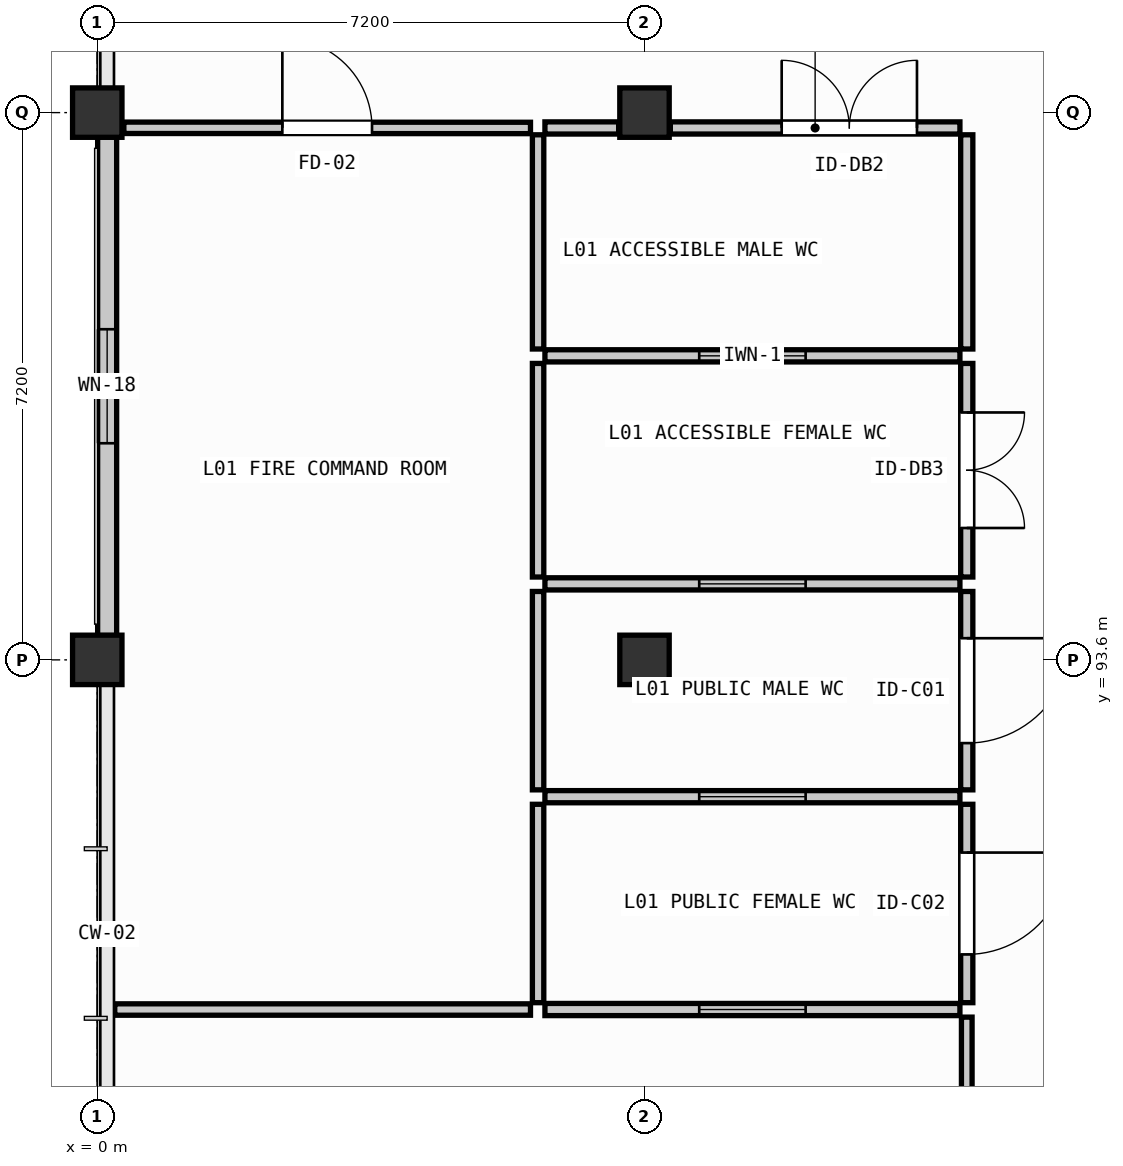
"""IFC4 building model, lengths in metres.
Left out: names, types, materials, properties, quantities, classifications, styles, units other than length and angle.
Written with IfcOpenShell. Run it as: python <this file> out.ifc"""

import sys

from ifc_helpers import new_model, si_unit, direction, frame, frame_2d, origin, origin_2d, place, context, subcontext, project, spatial, rectangle, extrude, element, fill, save


model = new_model("IFC4")
c1 = context("Model", 3, precision=1e-05, world=origin(), true_north=direction((0.0, 1.0)))
c2 = subcontext(c1, "Body", "Model", "MODEL_VIEW")
j1 = project(units=[si_unit("LENGTHUNIT", "METRE"), si_unit("PLANEANGLEUNIT", "RADIAN")], contexts=[c1])
p1 = place(None, origin())
s1 = spatial("IfcSite", under=j1, at=p1, CompositionType="ELEMENT")
p2 = place(p1, origin())
s2 = spatial("IfcBuilding", under=s1, at=p2, CompositionType="ELEMENT")
p3 = place(p2, origin())
s3 = spatial("IfcBuildingStorey", under=s2, at=p3, CompositionType="ELEMENT", Elevation=0.0)
for number, where, z_axis, x_axis in (
    (1, (0.0, 93.6, 0.0), (0.0, 0.0, 1.0), (1.0, 0.0, 0.0)),
    (2, (0.0, 100.8, 0.0), (0.0, 0.0, 1.0), (1.0, 0.0, 0.0)),
    (3, (7.2, 93.6, 0.0), (0.0, 0.0, 1.0), (1.0, 0.0, 0.0)),
    (4, (7.2, 100.8, 0.0), (0.0, 0.0, 1.0), (1.0, 0.0, 0.0)),
):
    element("IfcColumn", number, at=place(p3, frame(where, z_axis=z_axis, x_axis=x_axis)), inside=s3, PredefinedType="COLUMN", context=c2, shape_type="SweptSolid", body=[
        extrude(rectangle(XDim=0.65, YDim=0.65, at=origin_2d()), origin(), (0.0, 0.0, 1.0), 4.56),
    ])
p4 = place(p3, frame((0.13, 93.92, 0.0), z_axis=(0.0, 0.0, 1.0), x_axis=(0.0, 1.0, 0.0)))
e5 = element("IfcWall", 5, at=p4, inside=s3, PredefinedType="SOLIDWALL", context=c2, shape_type="SweptSolid", body=[
    extrude(rectangle(XDim=6.56, YDim=0.25, at=frame_2d((3.28, 0.0))), origin(), (0.0, 0.0, 1.0), 3.76),
])
p5 = place(p4, frame((2.53, 0.0, 1.5)))
e6 = element("IfcOpeningElement", 6, at=p5, cuts=e5, PredefinedType="OPENING", context=c2, shape_type="SweptSolid", body=[
    extrude(rectangle(XDim=1.5, YDim=0.95, at=frame_2d((0.75, 0.475))), frame((0.0, 0.135, 0.0), z_axis=(0.0, -1.0, 0.0), x_axis=(1.0, 0.0, 0.0)), (0.0, 0.0, 1.0), 0.27),
])
p6 = place(p3, frame((5.89, 100.598, 0.0), z_axis=(0.0, 0.0, 1.0), x_axis=(1.0, 0.0, 0.0)))
e7 = element("IfcWall", 7, at=p6, inside=s3, PredefinedType="PLUMBINGWALL", context=c2, shape_type="SweptSolid", body=[
    extrude(rectangle(XDim=0.97, YDim=0.16, at=frame_2d((0.485, 0.0))), origin(), (0.0, 0.0, 1.0), 3.76),
])
p7 = place(p3, frame((7.54, 100.598, 0.0), z_axis=(0.0, 0.0, 1.0), x_axis=(1.0, 0.0, 0.0)))
e8 = element("IfcWall", 8, at=p7, inside=s3, PredefinedType="PLUMBINGWALL", context=c2, shape_type="SweptSolid", body=[
    extrude(rectangle(XDim=3.81, YDim=0.16, at=frame_2d((1.905, 0.0))), origin(), (0.0, 0.0, 1.0), 3.76),
])
p8 = place(p7, frame((1.465, 0.0, 0.0)))
e9 = element("IfcOpeningElement", 9, at=p8, cuts=e8, PredefinedType="OPENING", context=c2, shape_type="SweptSolid", body=[
    extrude(rectangle(XDim=1.78, YDim=2.32, at=frame_2d((0.89, 1.16))), frame((0.0, 0.09, 0.0), z_axis=(0.0, -1.0, 0.0), x_axis=(1.0, 0.0, 0.0)), (0.0, 0.0, 1.0), 0.18),
])
p9 = place(p3, frame((11.44, 100.508, 0.0), z_axis=(0.0, 0.0, 1.0), x_axis=(0.0, -1.0, 0.0)))
e10 = element("IfcWall", 10, at=p9, inside=s3, PredefinedType="PLUMBINGWALL", context=c2, shape_type="SweptSolid", body=[
    extrude(rectangle(XDim=2.818, YDim=0.16, at=frame_2d((1.409, 0.0))), origin(), (0.0, 0.0, 1.0), 3.76),
])
p10 = place(p3, frame((11.35, 97.6, 0.0), z_axis=(0.0, 0.0, 1.0), x_axis=(-1.0, 0.0, 0.0)))
e11 = element("IfcWall", 11, at=p10, inside=s3, PredefinedType="PLUMBINGWALL", context=c2, shape_type="SweptSolid", body=[
    extrude(rectangle(XDim=5.46, YDim=0.16, at=frame_2d((2.73, 0.0))), origin(), (0.0, 0.0, 1.0), 3.86),
])
p11 = place(p10, frame((2.03, 0.0, 1.15)))
e12 = element("IfcOpeningElement", 12, at=p11, cuts=e11, PredefinedType="OPENING", context=c2, shape_type="SweptSolid", body=[
    extrude(rectangle(XDim=1.4, YDim=1.05, at=frame_2d((0.7, 0.525))), frame((0.0, 0.09, 0.0), z_axis=(0.0, -1.0, 0.0), x_axis=(1.0, 0.0, 0.0)), (0.0, 0.0, 1.0), 0.18),
])
p12 = place(p3, frame((5.8, 97.69, 0.0), z_axis=(0.0, 0.0, 1.0), x_axis=(0.0, 1.0, 0.0)))
e13 = element("IfcWall", 13, at=p12, inside=s3, PredefinedType="PARTITIONING", context=c2, shape_type="SweptSolid", body=[
    extrude(rectangle(XDim=2.818, YDim=0.15, at=frame_2d((1.409, 0.0))), origin(), (0.0, 0.0, 1.0), 3.76),
])
p13 = place(p3, frame((11.44, 97.5, 0.0), z_axis=(0.0, 0.0, 1.0), x_axis=(0.0, -1.0, 0.0)))
e14 = element("IfcWall", 14, at=p13, inside=s3, PredefinedType="PLUMBINGWALL", context=c2, shape_type="SweptSolid", body=[
    extrude(rectangle(XDim=2.81, YDim=0.16, at=frame_2d((1.405, 0.0))), origin(), (0.0, 0.0, 1.0), 4.57),
])
p14 = place(p13, frame((0.645, 0.0, 0.0)))
e15 = element("IfcOpeningElement", 15, at=p14, cuts=e14, PredefinedType="OPENING", context=c2, shape_type="SweptSolid", body=[
    extrude(rectangle(XDim=1.52, YDim=2.26, at=frame_2d((0.76, 1.13))), frame((0.0, 0.09, 0.0), z_axis=(0.0, -1.0, 0.0), x_axis=(1.0, 0.0, 0.0)), (0.0, 0.0, 1.0), 0.18),
])
p15 = place(p3, frame((11.35, 94.6, 0.0), z_axis=(0.0, 0.0, 1.0), x_axis=(-1.0, 0.0, 0.0)))
e16 = element("IfcWall", 16, at=p15, inside=s3, PredefinedType="PLUMBINGWALL", context=c2, shape_type="SweptSolid", body=[
    extrude(rectangle(XDim=5.46, YDim=0.16, at=frame_2d((2.73, 0.0))), origin(), (0.0, 0.0, 1.0), 3.86),
])
p16 = place(p15, frame((2.03, 0.0, 1.15)))
e17 = element("IfcOpeningElement", 17, at=p16, cuts=e16, PredefinedType="OPENING", context=c2, shape_type="SweptSolid", body=[
    extrude(rectangle(XDim=1.4, YDim=1.05, at=frame_2d((0.7, 0.525))), frame((0.0, 0.09, 0.0), z_axis=(0.0, -1.0, 0.0), x_axis=(1.0, 0.0, 0.0)), (0.0, 0.0, 1.0), 0.18),
])
p17 = place(p3, frame((5.8, 94.69, 0.0), z_axis=(0.0, 0.0, 1.0), x_axis=(0.0, 1.0, 0.0)))
e18 = element("IfcWall", 18, at=p17, inside=s3, PredefinedType="PARTITIONING", context=c2, shape_type="SweptSolid", body=[
    extrude(rectangle(XDim=2.81, YDim=0.15, at=frame_2d((1.405, 0.0))), origin(), (0.0, 0.0, 1.0), 4.57),
])
p18 = place(p3, frame((11.44, 94.5, 0.0), z_axis=(0.0, 0.0, 1.0), x_axis=(0.0, -1.0, 0.0)))
e19 = element("IfcWall", 19, at=p18, inside=s3, PredefinedType="PLUMBINGWALL", context=c2, shape_type="SweptSolid", body=[
    extrude(rectangle(XDim=2.61, YDim=0.16, at=frame_2d((1.305, 0.0))), origin(), (0.0, 0.0, 1.0), 3.76),
])
p19 = place(p18, frame((0.615, 0.0, 0.0)))
e20 = element("IfcOpeningElement", 20, at=p19, cuts=e19, PredefinedType="OPENING", context=c2, shape_type="SweptSolid", body=[
    extrude(rectangle(XDim=1.38, YDim=2.32, at=frame_2d((0.69, 1.16))), frame((0.0, 0.09, 0.0), z_axis=(0.0, -1.0, 0.0), x_axis=(1.0, 0.0, 0.0)), (0.0, 0.0, 1.0), 0.18),
])
p20 = place(p3, frame((11.35, 91.8, 0.0), z_axis=(0.0, 0.0, 1.0), x_axis=(-1.0, 0.0, 0.0)))
e21 = element("IfcWall", 21, at=p20, inside=s3, PredefinedType="PLUMBINGWALL", context=c2, shape_type="SweptSolid", body=[
    extrude(rectangle(XDim=5.46, YDim=0.16, at=frame_2d((2.73, 0.0))), origin(), (0.0, 0.0, 1.0), 3.86),
])
p21 = place(p20, frame((2.03, 0.0, 1.15)))
e22 = element("IfcOpeningElement", 22, at=p21, cuts=e21, PredefinedType="OPENING", context=c2, shape_type="SweptSolid", body=[
    extrude(rectangle(XDim=1.4, YDim=1.05, at=frame_2d((0.7, 0.525))), frame((0.0, 0.09, 0.0), z_axis=(0.0, -1.0, 0.0), x_axis=(1.0, 0.0, 0.0)), (0.0, 0.0, 1.0), 0.18),
])
p22 = place(p3, frame((5.8, 91.89, 0.0), z_axis=(0.0, 0.0, 1.0), x_axis=(0.0, 1.0, 0.0)))
e23 = element("IfcWall", 23, at=p22, inside=s3, PredefinedType="PARTITIONING", context=c2, shape_type="SweptSolid", body=[
    extrude(rectangle(XDim=2.61, YDim=0.15, at=frame_2d((1.305, 0.0))), origin(), (0.0, 0.0, 1.0), 3.76),
])
p23 = place(p3, frame((11.44, 91.7, 0.0), z_axis=(0.0, 0.0, 1.0), x_axis=(0.0, -1.0, 0.0)))
e24 = element("IfcWall", 24, at=p23, inside=s3, PredefinedType="PLUMBINGWALL", context=c2, shape_type="SweptSolid", body=[
    extrude(rectangle(XDim=2.61, YDim=0.16, at=frame_2d((1.305, 0.0))), origin(), (0.0, 0.0, 1.0), 4.57),
])
p24 = place(p23, frame((0.635, 0.0, 0.0)))
e25 = element("IfcOpeningElement", 25, at=p24, cuts=e24, PredefinedType="OPENING", context=c2, shape_type="SweptSolid", body=[
    extrude(rectangle(XDim=1.34, YDim=2.24, at=frame_2d((0.67, 1.12))), frame((0.0, 0.09, 0.0), z_axis=(0.0, -1.0, 0.0), x_axis=(1.0, 0.0, 0.0)), (0.0, 0.0, 1.0), 0.18),
])
p25 = place(p3, frame((11.35, 89.0, 0.0), z_axis=(0.0, 0.0, 1.0), x_axis=(-1.0, 0.0, 0.0)))
e26 = element("IfcWall", 26, at=p25, inside=s3, PredefinedType="PLUMBINGWALL", context=c2, shape_type="SweptSolid", body=[
    extrude(rectangle(XDim=5.46, YDim=0.16, at=frame_2d((2.73, 0.0))), origin(), (0.0, 0.0, 1.0), 3.86),
])
p26 = place(p25, frame((2.03, 0.0, 1.15)))
e27 = element("IfcOpeningElement", 27, at=p26, cuts=e26, PredefinedType="OPENING", context=c2, shape_type="SweptSolid", body=[
    extrude(rectangle(XDim=1.4, YDim=1.05, at=frame_2d((0.7, 0.525))), frame((0.0, 0.09, 0.0), z_axis=(0.0, -1.0, 0.0), x_axis=(1.0, 0.0, 0.0)), (0.0, 0.0, 1.0), 0.18),
])
p27 = place(p3, frame((5.8, 89.09, 0.0), z_axis=(0.0, 0.0, 1.0), x_axis=(0.0, 1.0, 0.0)))
e28 = element("IfcWall", 28, at=p27, inside=s3, PredefinedType="PARTITIONING", context=c2, shape_type="SweptSolid", body=[
    extrude(rectangle(XDim=2.61, YDim=0.15, at=frame_2d((1.305, 0.0))), origin(), (0.0, 0.0, 1.0), 4.57),
])
p28 = place(p3, frame((0.35, 100.6, 0.0), z_axis=(0.0, 0.0, 1.0), x_axis=(0.999999915657, -0.000410715066, 0.0)))
e29 = element("IfcWall", 29, at=p28, inside=s3, PredefinedType="PARTITIONING", context=c2, shape_type="SweptSolid", body=[
    extrude(rectangle(XDim=5.35, YDim=0.15, at=frame_2d((2.675, 0.0))), origin(), (0.0, 0.0, 1.0), 3.76),
])
p29 = place(p28, frame((2.085, 0.0, 0.0)))
e30 = element("IfcOpeningElement", 30, at=p29, cuts=e29, PredefinedType="OPENING", context=c2, shape_type="SweptSolid", body=[
    extrude(rectangle(XDim=1.18, YDim=2.16, at=frame_2d((0.59, 1.08))), frame((0.0, 0.085, 0.0), z_axis=(0.0, -1.0, 0.0), x_axis=(1.0, 0.0, 0.0)), (0.0, 0.0, 1.0), 0.17),
])
p30 = place(p3, frame((5.7, 89.0, 0.0), z_axis=(0.0, 0.0, 1.0), x_axis=(-1.0, 0.0, 0.0)))
e31 = element("IfcWall", 31, at=p30, inside=s3, PredefinedType="PARTITIONING", context=c2, shape_type="SweptSolid", body=[
    extrude(rectangle(XDim=5.47, YDim=0.15, at=frame_2d((2.735, 0.0))), origin(), (0.0, 0.0, 1.0), 3.86),
])
p31 = place(p3, frame((11.44, 88.9, 0.0), z_axis=(0.0, 0.0, 1.0), x_axis=(0.0, -1.0, 0.0)))
e32 = element("IfcWall", 32, at=p31, inside=s3, PredefinedType="PARTITIONING", context=c2, shape_type="SweptSolid", body=[
    extrude(rectangle(XDim=16.67, YDim=0.14, at=frame_2d((8.335, 0.0))), origin(), (0.0, 0.0, 1.0), 3.76),
])
p32 = place(p31, frame((7.475, 0.0, 0.0)))
e33 = element("IfcOpeningElement", 33, at=p32, cuts=e32, PredefinedType="OPENING", context=c2, shape_type="SweptSolid", body=[
    extrude(rectangle(XDim=1.72, YDim=2.26, at=frame_2d((0.86, 1.13))), frame((0.0, 0.08, 0.0), z_axis=(0.0, -1.0, 0.0), x_axis=(1.0, 0.0, 0.0)), (0.0, 0.0, 1.0), 0.16),
])
p33 = place(p5, origin())
e34 = element("IfcWindow", 34, at=p33, inside=s3, PartitioningType="SINGLE_PANEL", PredefinedType="WINDOW", context=c2, shape_type="SweptSolid", body=[
    extrude(rectangle(XDim=1.5, YDim=0.95, at=frame_2d((0.75, 0.475))), frame((0.0, 0.03, 0.0), z_axis=(0.0, -1.0, 0.0), x_axis=(1.0, 0.0, 0.0)), (0.0, 0.0, 1.0), 0.06),
])
fill(e6, e34)
p34 = place(p8, origin())
e35 = element("IfcDoor", 35, at=p34, inside=s3, OperationType="DOUBLE_DOOR_SINGLE_SWING", PredefinedType="DOOR", context=c2, shape_type="SweptSolid", body=[
    extrude(rectangle(XDim=1.78, YDim=2.32, at=frame_2d((0.89, 1.16))), frame((0.0, 0.025, 0.0), z_axis=(0.0, -1.0, 0.0), x_axis=(1.0, 0.0, 0.0)), (0.0, 0.0, 1.0), 0.05),
])
fill(e9, e35)
p35 = place(p11, origin())
e36 = element("IfcWindow", 36, at=p35, inside=s3, PartitioningType="SINGLE_PANEL", PredefinedType="WINDOW", context=c2, shape_type="SweptSolid", body=[
    extrude(rectangle(XDim=1.4, YDim=1.05, at=frame_2d((0.7, 0.525))), frame((0.0, 0.03, 0.0), z_axis=(0.0, -1.0, 0.0), x_axis=(1.0, 0.0, 0.0)), (0.0, 0.0, 1.0), 0.06),
])
fill(e12, e36)
p36 = place(p14, origin())
e37 = element("IfcDoor", 37, at=p36, inside=s3, OperationType="DOUBLE_DOOR_SINGLE_SWING", PredefinedType="DOOR", context=c2, shape_type="SweptSolid", body=[
    extrude(rectangle(XDim=1.52, YDim=2.26, at=frame_2d((0.76, 1.13))), frame((0.0, 0.025, 0.0), z_axis=(0.0, -1.0, 0.0), x_axis=(1.0, 0.0, 0.0)), (0.0, 0.0, 1.0), 0.05),
])
fill(e15, e37)
p37 = place(p16, origin())
e38 = element("IfcWindow", 38, at=p37, inside=s3, PartitioningType="SINGLE_PANEL", PredefinedType="WINDOW", context=c2, shape_type="SweptSolid", body=[
    extrude(rectangle(XDim=1.4, YDim=1.05, at=frame_2d((0.7, 0.525))), frame((0.0, 0.03, 0.0), z_axis=(0.0, -1.0, 0.0), x_axis=(1.0, 0.0, 0.0)), (0.0, 0.0, 1.0), 0.06),
])
fill(e17, e38)
p38 = place(p19, origin())
e39 = element("IfcDoor", 39, at=p38, inside=s3, OperationType="SINGLE_SWING_LEFT", PredefinedType="DOOR", context=c2, shape_type="SweptSolid", body=[
    extrude(rectangle(XDim=1.38, YDim=2.32, at=frame_2d((0.69, 1.16))), frame((0.0, 0.025, 0.0), z_axis=(0.0, -1.0, 0.0), x_axis=(1.0, 0.0, 0.0)), (0.0, 0.0, 1.0), 0.05),
])
fill(e20, e39)
p39 = place(p21, origin())
e40 = element("IfcWindow", 40, at=p39, inside=s3, PartitioningType="SINGLE_PANEL", PredefinedType="WINDOW", context=c2, shape_type="SweptSolid", body=[
    extrude(rectangle(XDim=1.4, YDim=1.05, at=frame_2d((0.7, 0.525))), frame((0.0, 0.03, 0.0), z_axis=(0.0, -1.0, 0.0), x_axis=(1.0, 0.0, 0.0)), (0.0, 0.0, 1.0), 0.06),
])
fill(e22, e40)
p40 = place(p24, origin())
e41 = element("IfcDoor", 41, at=p40, inside=s3, OperationType="SINGLE_SWING_RIGHT", PredefinedType="DOOR", context=c2, shape_type="SweptSolid", body=[
    extrude(rectangle(XDim=1.34, YDim=2.24, at=frame_2d((0.67, 1.12))), frame((0.0, 0.025, 0.0), z_axis=(0.0, -1.0, 0.0), x_axis=(1.0, 0.0, 0.0)), (0.0, 0.0, 1.0), 0.05),
])
fill(e25, e41)
p41 = place(p26, origin())
e42 = element("IfcWindow", 42, at=p41, inside=s3, PartitioningType="SINGLE_PANEL", PredefinedType="WINDOW", context=c2, shape_type="SweptSolid", body=[
    extrude(rectangle(XDim=1.4, YDim=1.05, at=frame_2d((0.7, 0.525))), frame((0.0, 0.03, 0.0), z_axis=(0.0, -1.0, 0.0), x_axis=(1.0, 0.0, 0.0)), (0.0, 0.0, 1.0), 0.06),
])
fill(e27, e42)
p42 = place(p29, origin())
e43 = element("IfcDoor", 43, at=p42, inside=s3, OperationType="SINGLE_SWING_LEFT", PredefinedType="DOOR", context=c2, shape_type="SweptSolid", body=[
    extrude(rectangle(XDim=1.18, YDim=2.16, at=frame_2d((0.59, 1.08))), frame((0.0, 0.025, 0.0), z_axis=(0.0, -1.0, 0.0), x_axis=(1.0, 0.0, 0.0)), (0.0, 0.0, 1.0), 0.05),
])
fill(e30, e43)
save(model, sys.argv[1])
